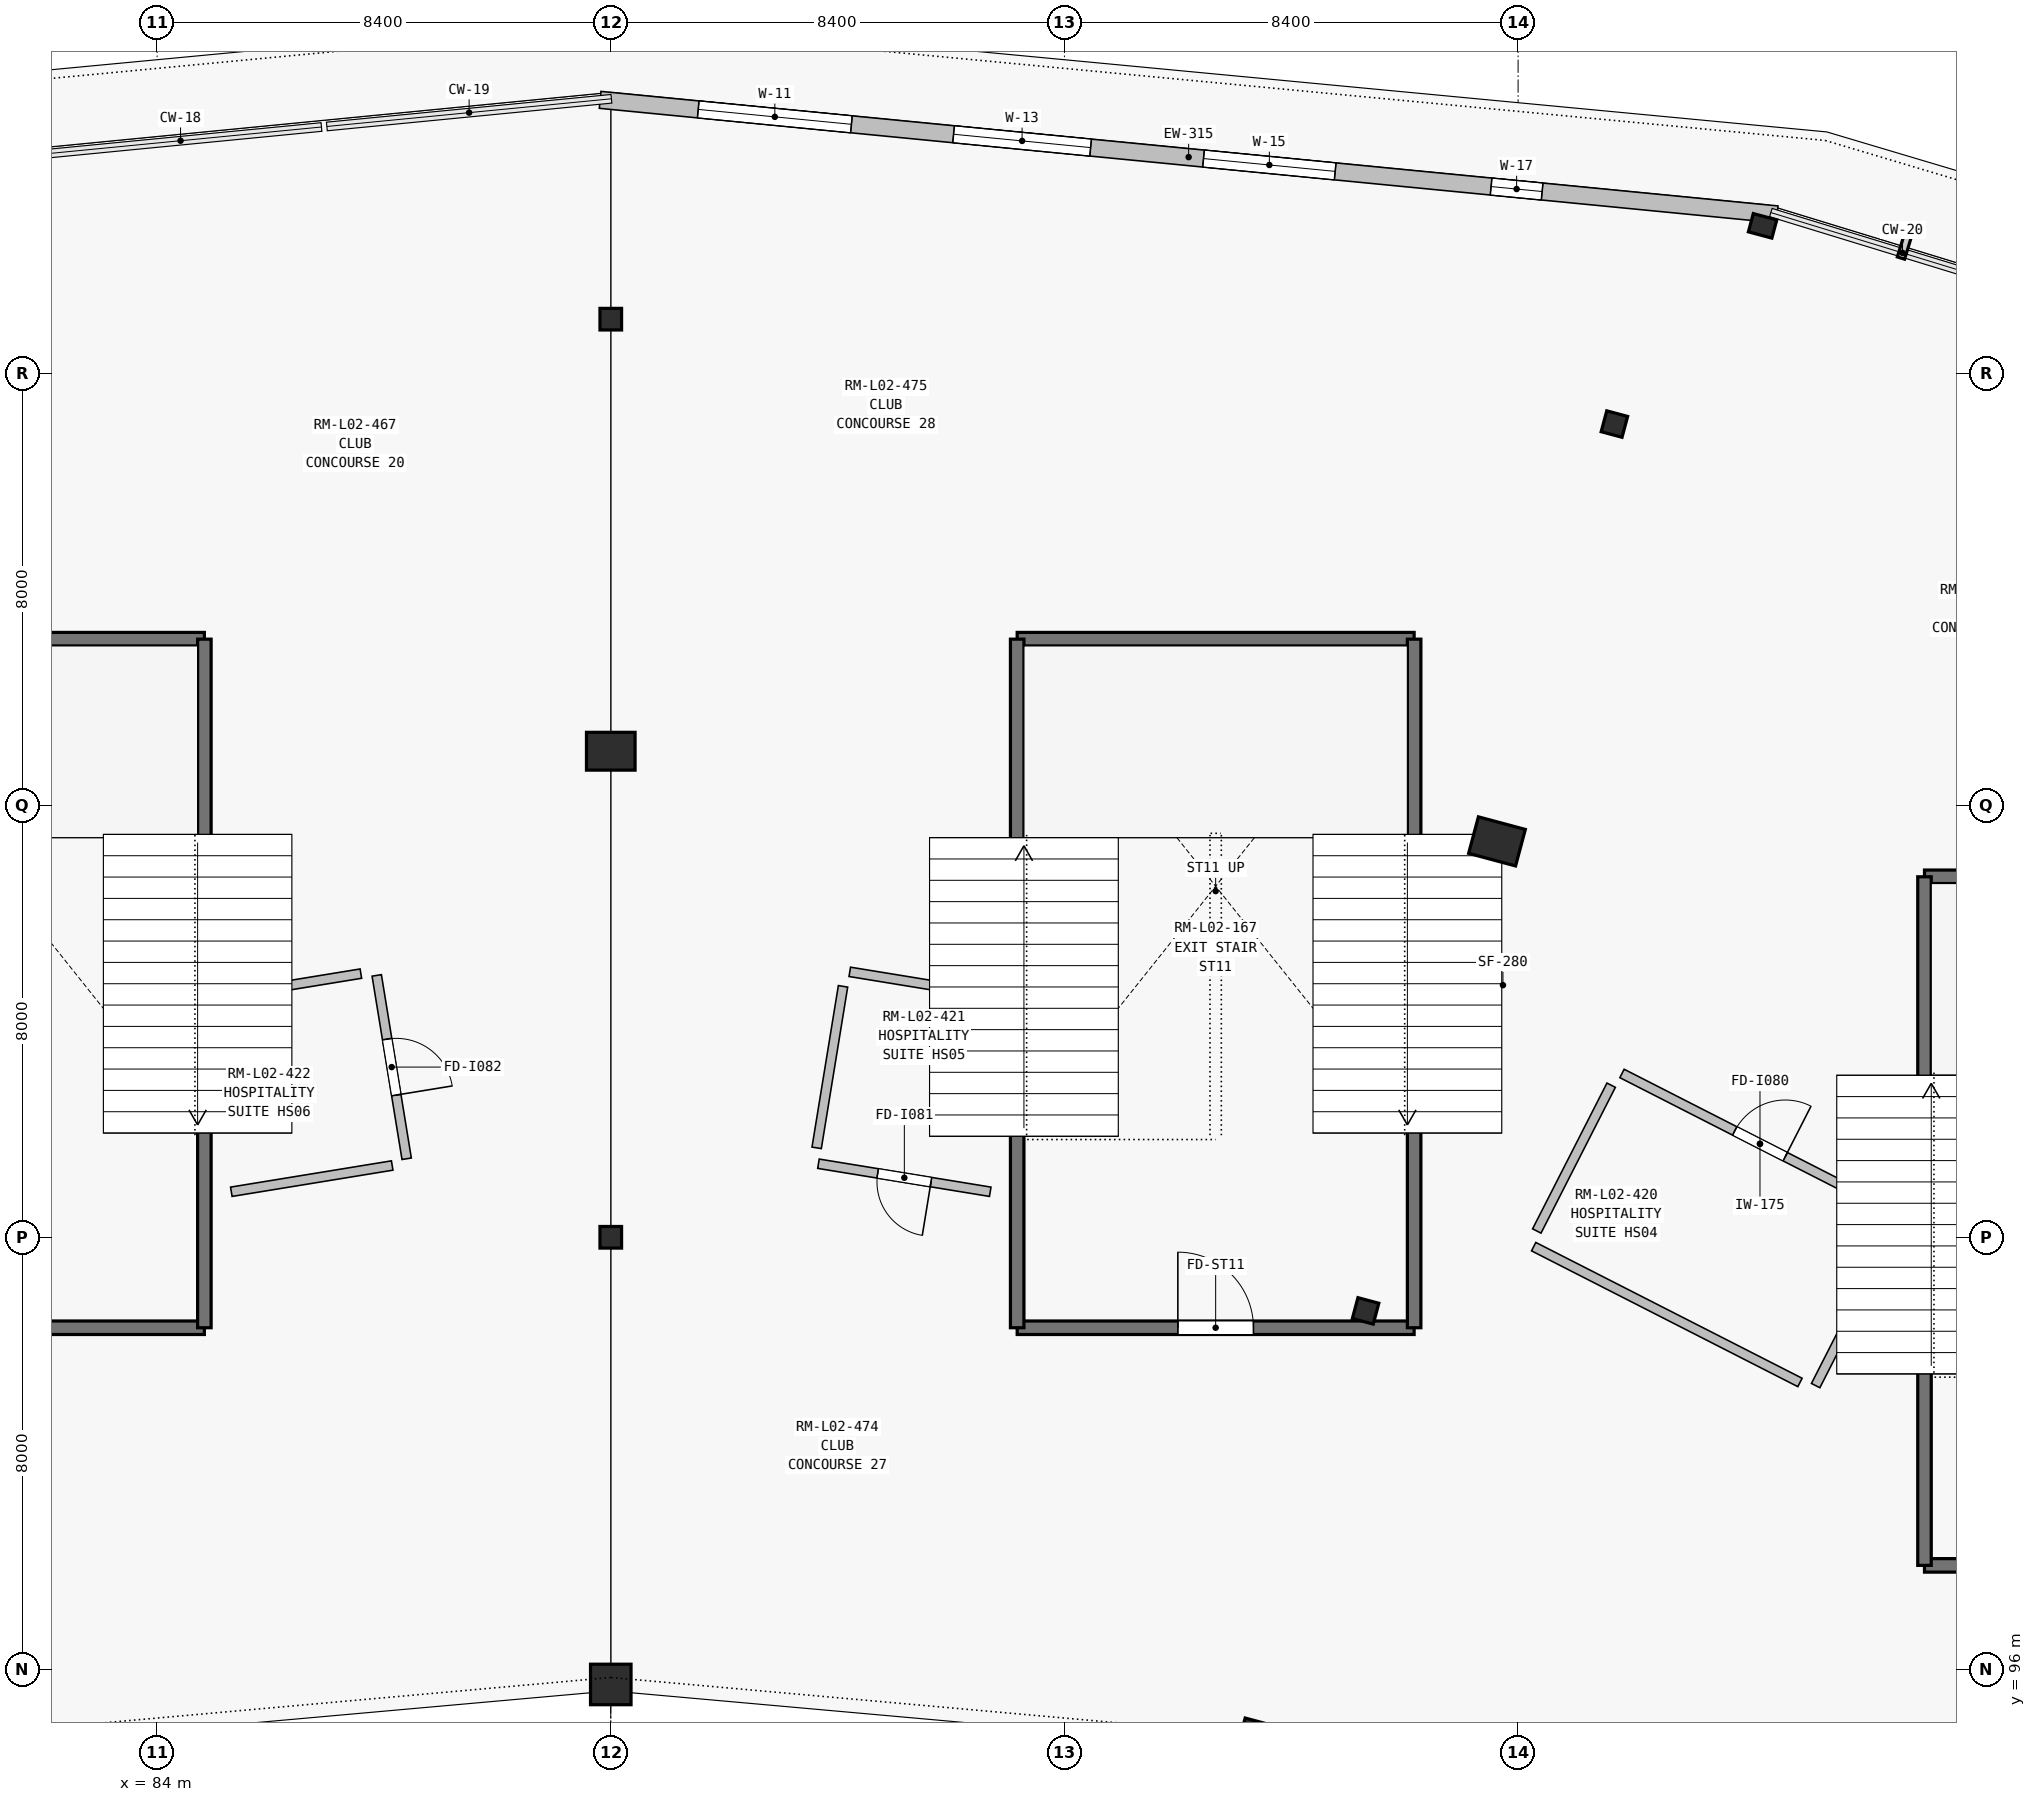
"""IFC4 building model, lengths in metres.
Left out: names, types, materials, properties, quantities, classifications, styles, units other than length and angle.
Written with IfcOpenShell. Run it as: python <this file> out.ifc"""

import sys

from ifc_helpers import new_model, si_unit, direction, frame, frame_2d, origin, origin_2d, place, context, subcontext, project, spatial, rectangle, i_section, extrude, element, fill, save


model = new_model("IFC4")
c1 = context("Model", 3, precision=1e-05, world=origin(), true_north=direction((0.0, 1.0)))
c2 = subcontext(c1, "Body", "Model", "MODEL_VIEW")
j1 = project(units=[si_unit("LENGTHUNIT", "METRE"), si_unit("PLANEANGLEUNIT", "RADIAN")], contexts=[c1])
p1 = place(None, origin())
s1 = spatial("IfcSite", under=j1, at=p1, CompositionType="ELEMENT")
p2 = place(p1, origin())
s2 = spatial("IfcBuilding", under=s1, at=p2, CompositionType="ELEMENT")
p3 = place(p2, frame((0.0, 0.0, 9.9)))
s3 = spatial("IfcBuildingStorey", under=s2, at=p3, CompositionType="ELEMENT", Elevation=9.9)
for number, where, z_axis, x_axis in (
    (1, (106.376, 102.637, 0.0), (0.0, 0.0, 1.0), (0.259, 0.966, 0.0)),
    (2, (92.4, 104.0, 0.0), (0.0, 0.0, 1.0), (0.0, 1.0, 0.0)),
):
    element("IfcColumn", number, at=place(p3, frame(where, z_axis=z_axis, x_axis=x_axis)), inside=s3, PredefinedType="COLUMN", context=c2, shape_type="SweptSolid", body=[
        extrude(i_section(OverallWidth=0.4, OverallDepth=0.4, WebThickness=0.018, FlangeThickness=0.032, at=origin_2d()), origin(), (0.0, 0.0, 1.0), 4.5),
    ])
p4 = place(p3, frame((104.412, 94.639, 0.0), z_axis=(0.0, 0.0, 1.0), x_axis=(0.258819045103, 0.965925826289, 0.0)))
e3 = element("IfcColumn", 3, at=p4, inside=s3, PredefinedType="COLUMN", context=c2, shape_type="SweptSolid", body=[
    extrude(rectangle(XDim=0.75, YDim=0.75, at=origin_2d()), origin(), (0.0, 0.0, 1.0), 3.553),
])
p5 = place(p3, frame((92.4, 95.72, 0.0), z_axis=(0.0, 0.0, 1.0), x_axis=(0.0, 1.0, 0.0)))
e4 = element("IfcColumn", 4, at=p5, inside=s3, PredefinedType="COLUMN", context=c2, shape_type="SweptSolid", body=[
    extrude(rectangle(XDim=0.75, YDim=0.75, at=origin_2d()), origin(), (0.0, 0.0, 1.0), 3.554),
])
for number, where, z_axis, x_axis in (
    (5, (108.809, 111.33, 0.0), (0.0, 0.0, 1.0), (0.259, 0.966, 0.0)),
    (6, (92.4, 113.0, 0.0), (0.0, 0.0, 1.0), (0.0, 1.0, 0.0)),
):
    element("IfcColumn", number, at=place(p3, frame(where, z_axis=z_axis, x_axis=x_axis)), inside=s3, PredefinedType="COLUMN", context=c2, shape_type="SweptSolid", body=[
        extrude(rectangle(XDim=0.7, YDim=0.9, at=origin_2d()), origin(), (0.0, 0.0, 1.0), 4.5),
    ])
for number, where, z_axis, x_axis in (
    (7, (110.983, 119.058, 0.0), (0.0, 0.0, 1.0), (0.259, 0.966, 0.0)),
    (8, (92.4, 121.0, 0.0), (0.0, 0.0, 1.0), (0.0, 1.0, 0.0)),
):
    element("IfcColumn", number, at=place(p3, frame(where, z_axis=z_axis, x_axis=x_axis)), inside=s3, PredefinedType="COLUMN", context=c2, shape_type="SweptSolid", body=[
        extrude(i_section(OverallWidth=0.4, OverallDepth=0.4, WebThickness=0.016, FlangeThickness=0.028, at=origin_2d()), origin(), (0.0, 0.0, 1.0), 4.5),
    ])
p6 = place(p3, frame((113.727, 122.728, 0.0), z_axis=(0.0, 0.0, 1.0), x_axis=(0.258819045103, 0.965925826289, 0.0)))
e9 = element("IfcColumn", 9, at=p6, inside=s3, PredefinedType="PILASTER", context=c2, shape_type="SweptSolid", body=[
    extrude(rectangle(XDim=0.35, YDim=0.45, at=origin_2d()), origin(), (0.0, 0.0, 1.0), 5.45),
])
p7 = place(p3, frame((92.203, 125.061, 0.0), z_axis=(0.0, 0.0, 1.0), x_axis=(0.995299462798, -0.096845130773, 0.0)))
e10 = element("IfcWall", 10, at=p7, inside=s3, PredefinedType="SOLIDWALL", context=c2, shape_type="SweptSolid", body=[
    extrude(rectangle(XDim=21.897, YDim=0.315, at=frame_2d((10.948, 0.0))), origin(), (0.0, 0.0, 1.0), 4.265),
])
p8 = place(p7, frame((1.825, 0.0, 0.9)))
e11 = element("IfcOpeningElement", 11, at=p8, cuts=e10, PredefinedType="OPENING", context=c2, shape_type="SweptSolid", body=[
    extrude(rectangle(XDim=2.85, YDim=1.6, at=frame_2d((1.425, 0.8))), frame((0.0, 0.167, 0.0), z_axis=(0.0, -1.0, 0.0), x_axis=(1.0, 0.0, 0.0)), (0.0, 0.0, 1.0), 0.335),
])
p9 = place(p7, frame((6.575, 0.0, 0.9)))
e12 = element("IfcOpeningElement", 12, at=p9, cuts=e10, PredefinedType="OPENING", context=c2, shape_type="SweptSolid", body=[
    extrude(rectangle(XDim=2.55, YDim=1.55, at=frame_2d((1.275, 0.775))), frame((0.0, 0.167, 0.0), z_axis=(0.0, -1.0, 0.0), x_axis=(1.0, 0.0, 0.0)), (0.0, 0.0, 1.0), 0.335),
])
p10 = place(p7, frame((11.225, 0.0, 0.9)))
e13 = element("IfcOpeningElement", 13, at=p10, cuts=e10, PredefinedType="OPENING", context=c2, shape_type="SweptSolid", body=[
    extrude(rectangle(XDim=2.45, YDim=1.35, at=frame_2d((1.225, 0.675))), frame((0.0, 0.167, 0.0), z_axis=(0.0, -1.0, 0.0), x_axis=(1.0, 0.0, 0.0)), (0.0, 0.0, 1.0), 0.335),
])
p11 = place(p7, frame((16.575, 0.0, 0.75)))
e14 = element("IfcOpeningElement", 14, at=p11, cuts=e10, PredefinedType="OPENING", context=c2, shape_type="SweptSolid", body=[
    extrude(rectangle(XDim=0.95, YDim=2.2, at=frame_2d((0.475, 1.1))), frame((0.0, 0.167, 0.0), z_axis=(0.0, -1.0, 0.0), x_axis=(1.0, 0.0, 0.0)), (0.0, 0.0, 1.0), 0.335),
])
p12 = place(p3, frame((77.525, 102.325, 0.0), z_axis=(0.0, 0.0, 1.0), x_axis=(1.0, 0.0, 0.0)))
e15 = element("IfcWall", 15, at=p12, inside=s3, PredefinedType="SHEAR", context=c2, shape_type="SweptSolid", body=[
    extrude(rectangle(XDim=7.35, YDim=0.25, at=frame_2d((3.675, 0.0))), origin(), (0.0, 0.0, 1.0), 4.5),
])
p13 = place(p12, frame((3.015, 0.0, 0.0)))
e16 = element("IfcOpeningElement", 16, at=p13, cuts=e15, PredefinedType="OPENING", context=c2, shape_type="SweptSolid", body=[
    extrude(rectangle(XDim=1.32, YDim=2.2, at=frame_2d((0.66, 1.1))), frame((0.0, 0.135, 0.0), z_axis=(0.0, -1.0, 0.0), x_axis=(1.0, 0.0, 0.0)), (0.0, 0.0, 1.0), 0.27),
])
p14 = place(p3, frame((77.525, 115.075, 0.0), z_axis=(0.0, 0.0, 1.0), x_axis=(1.0, 0.0, 0.0)))
e17 = element("IfcWall", 17, at=p14, inside=s3, PredefinedType="SHEAR", context=c2, shape_type="SweptSolid", body=[
    extrude(rectangle(XDim=7.35, YDim=0.25, at=frame_2d((3.675, 0.0))), origin(), (0.0, 0.0, 1.0), 4.5),
])
p15 = place(p3, frame((84.875, 102.325, 0.0), z_axis=(0.0, 0.0, 1.0), x_axis=(0.0, 1.0, 0.0)))
e18 = element("IfcWall", 18, at=p15, inside=s3, PredefinedType="SHEAR", context=c2, shape_type="SweptSolid", body=[
    extrude(rectangle(XDim=12.75, YDim=0.25, at=frame_2d((6.375, 0.0))), origin(), (0.0, 0.0, 1.0), 4.5),
])
p16 = place(p3, frame((99.925, 102.325, 0.0), z_axis=(0.0, 0.0, 1.0), x_axis=(1.0, 0.0, 0.0)))
e19 = element("IfcWall", 19, at=p16, inside=s3, PredefinedType="SHEAR", context=c2, shape_type="SweptSolid", body=[
    extrude(rectangle(XDim=7.35, YDim=0.25, at=frame_2d((3.675, 0.0))), origin(), (0.0, 0.0, 1.0), 4.5),
])
p17 = place(p16, frame((2.975, 0.0, 0.0)))
e20 = element("IfcOpeningElement", 20, at=p17, cuts=e19, PredefinedType="OPENING", context=c2, shape_type="SweptSolid", body=[
    extrude(rectangle(XDim=1.4, YDim=2.2, at=frame_2d((0.7, 1.1))), frame((0.0, 0.135, 0.0), z_axis=(0.0, -1.0, 0.0), x_axis=(1.0, 0.0, 0.0)), (0.0, 0.0, 1.0), 0.27),
])
p18 = place(p3, frame((99.925, 115.075, 0.0), z_axis=(0.0, 0.0, 1.0), x_axis=(1.0, 0.0, 0.0)))
e21 = element("IfcWall", 21, at=p18, inside=s3, PredefinedType="SHEAR", context=c2, shape_type="SweptSolid", body=[
    extrude(rectangle(XDim=7.35, YDim=0.25, at=frame_2d((3.675, 0.0))), origin(), (0.0, 0.0, 1.0), 4.5),
])
for number, where, z_axis, x_axis in (
    (22, (99.925, 102.325, 0.0), (0.0, 0.0, 1.0), (0.0, 1.0, 0.0)),
    (23, (107.275, 102.325, 0.0), (0.0, 0.0, 1.0), (0.0, 1.0, 0.0)),
):
    element("IfcWall", number, at=place(p3, frame(where, z_axis=z_axis, x_axis=x_axis)), inside=s3, PredefinedType="SHEAR", context=c2, shape_type="SweptSolid", body=[
        extrude(rectangle(XDim=12.75, YDim=0.25, at=frame_2d((6.375, 0.0))), origin(), (0.0, 0.0, 1.0), 4.5),
    ])
p19 = place(p3, frame((116.725, 97.925, 0.0), z_axis=(0.0, 0.0, 1.0), x_axis=(1.0, 0.0, 0.0)))
e24 = element("IfcWall", 24, at=p19, inside=s3, PredefinedType="SHEAR", context=c2, shape_type="SweptSolid", body=[
    extrude(rectangle(XDim=7.35, YDim=0.25, at=frame_2d((3.675, 0.0))), origin(), (0.0, 0.0, 1.0), 4.5),
])
p20 = place(p19, frame((3.015, 0.0, 0.0)))
e25 = element("IfcOpeningElement", 25, at=p20, cuts=e24, PredefinedType="OPENING", context=c2, shape_type="SweptSolid", body=[
    extrude(rectangle(XDim=1.32, YDim=2.2, at=frame_2d((0.66, 1.1))), frame((0.0, 0.135, 0.0), z_axis=(0.0, -1.0, 0.0), x_axis=(1.0, 0.0, 0.0)), (0.0, 0.0, 1.0), 0.27),
])
p21 = place(p3, frame((116.725, 110.675, 0.0), z_axis=(0.0, 0.0, 1.0), x_axis=(1.0, 0.0, 0.0)))
e26 = element("IfcWall", 26, at=p21, inside=s3, PredefinedType="SHEAR", context=c2, shape_type="SweptSolid", body=[
    extrude(rectangle(XDim=7.35, YDim=0.25, at=frame_2d((3.675, 0.0))), origin(), (0.0, 0.0, 1.0), 4.5),
])
p22 = place(p3, frame((116.725, 97.925, 0.0), z_axis=(0.0, 0.0, 1.0), x_axis=(0.0, 1.0, 0.0)))
e27 = element("IfcWall", 27, at=p22, inside=s3, PredefinedType="SHEAR", context=c2, shape_type="SweptSolid", body=[
    extrude(rectangle(XDim=12.75, YDim=0.25, at=frame_2d((6.375, 0.0))), origin(), (0.0, 0.0, 1.0), 4.5),
])
p23 = place(p3, frame((111.124, 107.034, 0.0), z_axis=(0.0, 0.0, 1.0), x_axis=(0.890840624342, -0.454315949557, 0.0)))
e28 = element("IfcWall", 28, at=p23, inside=s3, PredefinedType="PARTITIONING", context=c2, shape_type="SweptSolid", body=[
    extrude(rectangle(XDim=5.736, YDim=0.175, at=frame_2d((2.868, 0.0))), origin(), (0.0, 0.0, 1.0), 4.2),
])
p24 = place(p23, frame((2.343, 0.0, 0.0)))
e29 = element("IfcOpeningElement", 29, at=p24, cuts=e28, PredefinedType="OPENING", context=c2, shape_type="SweptSolid", body=[
    extrude(rectangle(XDim=1.05, YDim=2.25, at=frame_2d((0.525, 1.125))), frame((0.0, 0.097, 0.0), z_axis=(0.0, -1.0, 0.0), x_axis=(1.0, 0.0, 0.0)), (0.0, 0.0, 1.0), 0.195),
])
p25 = place(p3, frame((116.18, 104.137, 0.0), z_axis=(0.0, 0.0, 1.0), x_axis=(-0.454320096684, -0.890838509354, 0.0)))
e30 = element("IfcWall", 30, at=p25, inside=s3, PredefinedType="PARTITIONING", context=c2, shape_type="SweptSolid", body=[
    extrude(rectangle(XDim=3.237, YDim=0.175, at=frame_2d((1.618, 0.0))), origin(), (0.0, 0.0, 1.0), 4.2),
])
p26 = place(p3, frame((114.419, 101.312, 0.0), z_axis=(0.0, 0.0, 1.0), x_axis=(-0.890835099449, 0.454326782821, 0.0)))
e31 = element("IfcWall", 31, at=p26, inside=s3, PredefinedType="PARTITIONING", context=c2, shape_type="SweptSolid", body=[
    extrude(rectangle(XDim=5.535, YDim=0.175, at=frame_2d((2.768, 0.0))), origin(), (0.0, 0.0, 1.0), 4.2),
])
p27 = place(p3, frame((109.546, 104.117, 0.0), z_axis=(0.0, 0.0, 1.0), x_axis=(0.454385541569, 0.890805129988, 0.0)))
e32 = element("IfcWall", 32, at=p27, inside=s3, PredefinedType="PARTITIONING", context=c2, shape_type="SweptSolid", body=[
    extrude(rectangle(XDim=3.03, YDim=0.175, at=frame_2d((1.515, 0.0))), origin(), (0.0, 0.0, 1.0), 4.2),
])
p28 = place(p3, frame((96.825, 108.915, 0.0), z_axis=(0.0, 0.0, 1.0), x_axis=(0.986936789199, -0.161107957985, 0.0)))
e33 = element("IfcWall", 33, at=p28, inside=s3, PredefinedType="PARTITIONING", context=c2, shape_type="SweptSolid", body=[
    extrude(rectangle(XDim=2.635, YDim=0.175, at=frame_2d((1.318, 0.0))), origin(), (0.0, 0.0, 1.0), 4.2),
])
p29 = place(p3, frame((99.426, 104.843, 0.0), z_axis=(0.0, 0.0, 1.0), x_axis=(-0.986933126632, 0.161130393026, 0.0)))
e34 = element("IfcWall", 34, at=p29, inside=s3, PredefinedType="PARTITIONING", context=c2, shape_type="SweptSolid", body=[
    extrude(rectangle(XDim=3.223, YDim=0.175, at=frame_2d((1.611, 0.0))), origin(), (0.0, 0.0, 1.0), 4.2),
])
p30 = place(p29, frame((1.111, 0.0, 0.0)))
e35 = element("IfcOpeningElement", 35, at=p30, cuts=e34, PredefinedType="OPENING", context=c2, shape_type="SweptSolid", body=[
    extrude(rectangle(XDim=1.0, YDim=2.2, at=frame_2d((0.5, 1.1))), frame((0.0, 0.097, 0.0), z_axis=(0.0, -1.0, 0.0), x_axis=(1.0, 0.0, 0.0)), (0.0, 0.0, 1.0), 0.195),
])
p31 = place(p3, frame((96.212, 105.656, 0.0), z_axis=(0.0, 0.0, 1.0), x_axis=(0.161131898902, 0.986932880776, 0.0)))
e36 = element("IfcWall", 36, at=p31, inside=s3, PredefinedType="PARTITIONING", context=c2, shape_type="SweptSolid", body=[
    extrude(rectangle(XDim=3.03, YDim=0.175, at=frame_2d((1.515, 0.0))), origin(), (0.0, 0.0, 1.0), 4.2),
])
p32 = place(p3, frame((88.067, 108.849, 0.0), z_axis=(0.0, 0.0, 1.0), x_axis=(0.161117789867, -0.986935184188, 0.0)))
e37 = element("IfcWall", 37, at=p32, inside=s3, PredefinedType="PARTITIONING", context=c2, shape_type="SweptSolid", body=[
    extrude(rectangle(XDim=3.44, YDim=0.175, at=frame_2d((1.72, 0.0))), origin(), (0.0, 0.0, 1.0), 4.19),
])
p33 = place(p32, frame((1.195, 0.0, 0.0)))
e38 = element("IfcOpeningElement", 38, at=p33, cuts=e37, PredefinedType="OPENING", context=c2, shape_type="SweptSolid", body=[
    extrude(rectangle(XDim=1.05, YDim=2.25, at=frame_2d((0.525, 1.125))), frame((0.0, 0.097, 0.0), z_axis=(0.0, -1.0, 0.0), x_axis=(1.0, 0.0, 0.0)), (0.0, 0.0, 1.0), 0.195),
])
p34 = place(p3, frame((88.353, 105.329, 0.0), z_axis=(0.0, 0.0, 1.0), x_axis=(-0.98693078035, -0.16114476348, 0.0)))
e39 = element("IfcWall", 39, at=p34, inside=s3, PredefinedType="PARTITIONING", context=c2, shape_type="SweptSolid", body=[
    extrude(rectangle(XDim=3.018, YDim=0.175, at=frame_2d((1.509, 0.0))), origin(), (0.0, 0.0, 1.0), 4.19),
])
p35 = place(p3, frame((85.374, 108.49, 0.0), z_axis=(0.0, 0.0, 1.0), x_axis=(0.986934184777, 0.161123911693, 0.0)))
e40 = element("IfcWall", 40, at=p35, inside=s3, PredefinedType="PARTITIONING", context=c2, shape_type="SweptSolid", body=[
    extrude(rectangle(XDim=2.43, YDim=0.175, at=frame_2d((1.215, 0.0))), origin(), (0.0, 0.0, 1.0), 4.19),
])
p36 = place(p8, origin())
e41 = element("IfcWindow", 41, at=p36, inside=s3, PartitioningType="SINGLE_PANEL", PredefinedType="WINDOW", context=c2, shape_type="SweptSolid", body=[
    extrude(rectangle(XDim=2.85, YDim=1.6, at=frame_2d((1.425, 0.8))), frame((0.0, 0.03, 0.0), z_axis=(0.0, -1.0, 0.0), x_axis=(1.0, 0.0, 0.0)), (0.0, 0.0, 1.0), 0.06),
])
fill(e11, e41)
p37 = place(p9, origin())
e42 = element("IfcWindow", 42, at=p37, inside=s3, PartitioningType="SINGLE_PANEL", PredefinedType="WINDOW", context=c2, shape_type="SweptSolid", body=[
    extrude(rectangle(XDim=2.55, YDim=1.55, at=frame_2d((1.275, 0.775))), frame((0.0, 0.03, 0.0), z_axis=(0.0, -1.0, 0.0), x_axis=(1.0, 0.0, 0.0)), (0.0, 0.0, 1.0), 0.06),
])
fill(e12, e42)
p38 = place(p10, origin())
e43 = element("IfcWindow", 43, at=p38, inside=s3, PartitioningType="SINGLE_PANEL", PredefinedType="WINDOW", context=c2, shape_type="SweptSolid", body=[
    extrude(rectangle(XDim=2.45, YDim=1.35, at=frame_2d((1.225, 0.675))), frame((0.0, 0.03, 0.0), z_axis=(0.0, -1.0, 0.0), x_axis=(1.0, 0.0, 0.0)), (0.0, 0.0, 1.0), 0.06),
])
fill(e13, e43)
p39 = place(p11, origin())
e44 = element("IfcWindow", 44, at=p39, inside=s3, PartitioningType="SINGLE_PANEL", PredefinedType="WINDOW", context=c2, shape_type="SweptSolid", body=[
    extrude(rectangle(XDim=0.95, YDim=2.2, at=frame_2d((0.475, 1.1))), frame((0.0, 0.03, 0.0), z_axis=(0.0, -1.0, 0.0), x_axis=(1.0, 0.0, 0.0)), (0.0, 0.0, 1.0), 0.06),
])
fill(e14, e44)
p40 = place(p17, origin())
e45 = element("IfcDoor", 45, at=p40, inside=s3, OperationType="SINGLE_SWING_LEFT", PredefinedType="DOOR", context=c2, shape_type="SweptSolid", body=[
    extrude(rectangle(XDim=1.4, YDim=2.2, at=frame_2d((0.7, 1.1))), frame((0.0, 0.025, 0.0), z_axis=(0.0, -1.0, 0.0), x_axis=(1.0, 0.0, 0.0)), (0.0, 0.0, 1.0), 0.05),
])
fill(e20, e45)
p41 = place(p24, origin())
e46 = element("IfcDoor", 46, at=p41, inside=s3, OperationType="SINGLE_SWING_RIGHT", PredefinedType="DOOR", context=c2, shape_type="SweptSolid", body=[
    extrude(rectangle(XDim=1.05, YDim=2.25, at=frame_2d((0.525, 1.125))), frame((0.0, 0.025, 0.0), z_axis=(0.0, -1.0, 0.0), x_axis=(1.0, 0.0, 0.0)), (0.0, 0.0, 1.0), 0.05),
])
fill(e29, e46)
p42 = place(p30, origin())
e47 = element("IfcDoor", 47, at=p42, inside=s3, OperationType="SINGLE_SWING_LEFT", PredefinedType="DOOR", context=c2, shape_type="SweptSolid", body=[
    extrude(rectangle(XDim=1.0, YDim=2.2, at=frame_2d((0.5, 1.1))), frame((0.0, 0.025, 0.0), z_axis=(0.0, -1.0, 0.0), x_axis=(1.0, 0.0, 0.0)), (0.0, 0.0, 1.0), 0.05),
])
fill(e35, e47)
p43 = place(p33, origin())
e48 = element("IfcDoor", 48, at=p43, inside=s3, OperationType="SINGLE_SWING_RIGHT", PredefinedType="DOOR", context=c2, shape_type="SweptSolid", body=[
    extrude(rectangle(XDim=1.05, YDim=2.25, at=frame_2d((0.525, 1.125))), frame((0.0, 0.025, 0.0), z_axis=(0.0, -1.0, 0.0), x_axis=(1.0, 0.0, 0.0)), (0.0, 0.0, 1.0), 0.05),
])
fill(e38, e48)
save(model, sys.argv[1])
